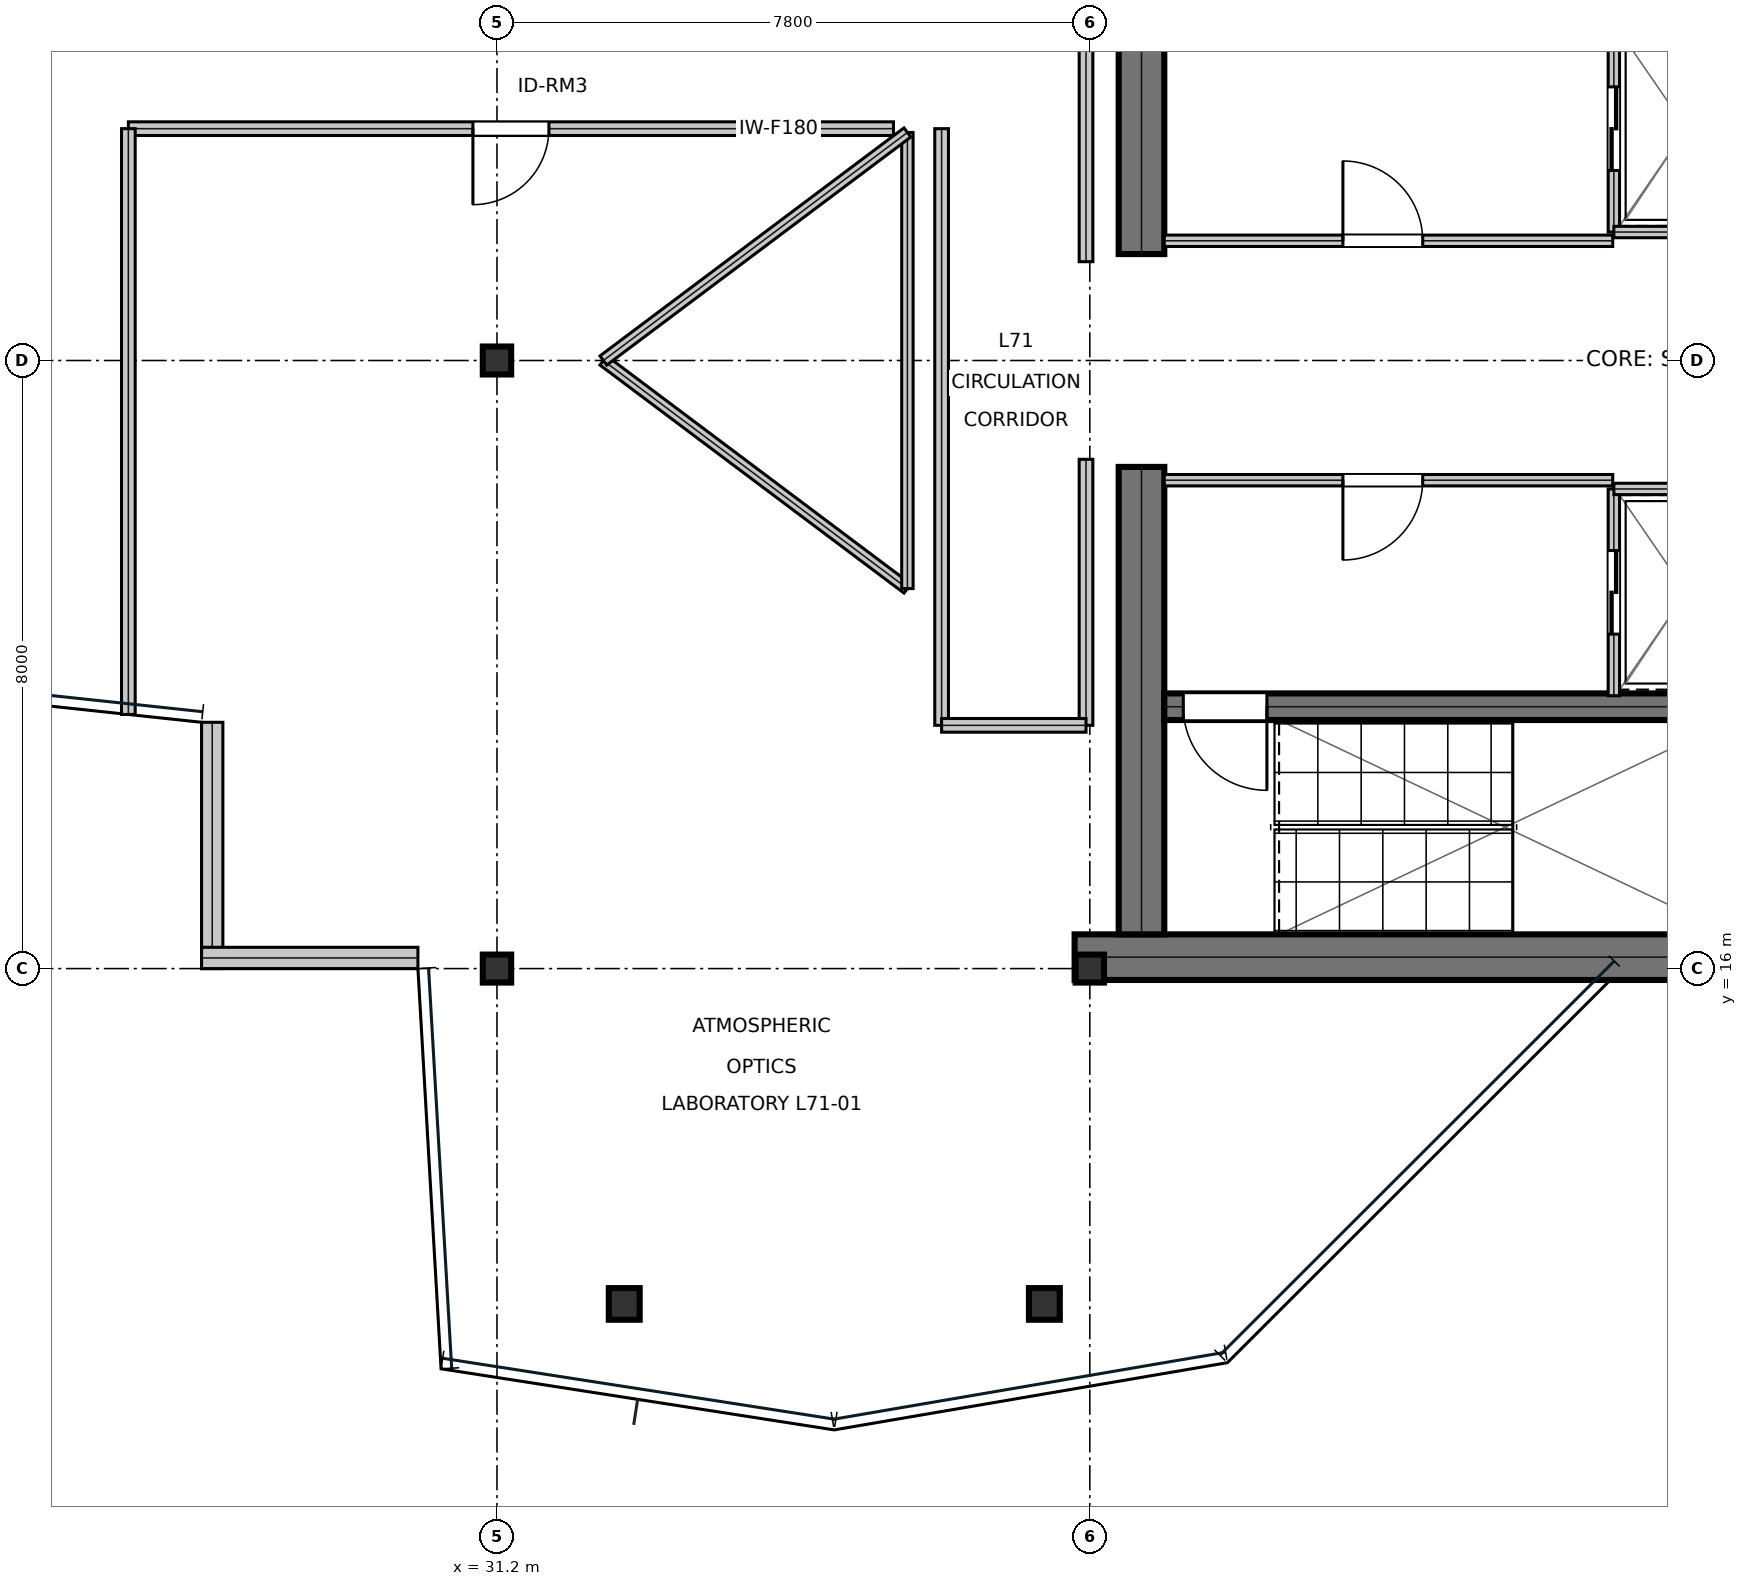
"""IFC4 building model, lengths in metres.
Left out: names, types, materials, properties, quantities, classifications, styles, units other than length and angle.
Written with IfcOpenShell. Run it as: python <this file> out.ifc"""

import sys

from ifc_helpers import new_model, si_unit, direction, frame, frame_2d, origin, origin_2d, place, context, subcontext, project, spatial, rectangle, i_section, extrude, element, fill, save


model = new_model("IFC4")
c1 = context("Model", 3, precision=1e-05, world=origin(), true_north=direction((0.0, 1.0)))
c2 = subcontext(c1, "Body", "Model", "MODEL_VIEW")
j1 = project(units=[si_unit("LENGTHUNIT", "METRE"), si_unit("PLANEANGLEUNIT", "RADIAN")], contexts=[c1])
p1 = place(None, origin())
s1 = spatial("IfcSite", under=j1, at=p1, CompositionType="ELEMENT")
p2 = place(p1, origin())
s2 = spatial("IfcBuilding", under=s1, at=p2, CompositionType="ELEMENT")
p3 = place(p2, frame((0.0, 0.0, 303.3)))
s3 = spatial("IfcBuildingStorey", under=s2, at=p3, CompositionType="ELEMENT", Elevation=303.3)
p4 = place(p3, frame((38.8, 16.15, 0.0), z_axis=(0.0, 0.0, 1.0), x_axis=(1.0, 0.0, 0.0)))
e1 = element("IfcWall", 1, at=p4, inside=s3, PredefinedType="SHEAR", context=c2, shape_type="SweptSolid", body=[
    extrude(rectangle(XDim=16.0, YDim=0.6, at=frame_2d((8.0, 0.0))), origin(), (0.0, 0.0, 1.0), 3.81),
])
for number, where, z_axis, x_axis in (
    (2, (39.68, 16.45, 0.0), (0.0, 0.0, 1.0), (0.0, 1.0, 0.0)),
    (3, (39.68, 25.4, 0.0), (0.0, 0.0, 1.0), (0.0, 1.0, 0.0)),
):
    element("IfcWall", number, at=place(p3, frame(where, z_axis=z_axis, x_axis=x_axis)), inside=s3, PredefinedType="SHEAR", context=c2, shape_type="SweptSolid", body=[
        extrude(rectangle(XDim=6.15, YDim=0.6, at=frame_2d((3.075, 0.0))), origin(), (0.0, 0.0, 1.0), 3.81),
    ])
p5 = place(p3, frame((39.98, 19.445, 0.0), z_axis=(0.0, 0.0, 1.0), x_axis=(1.0, 0.0, 0.0)))
e4 = element("IfcWall", 4, at=p5, inside=s3, PredefinedType="SHEAR", context=c2, shape_type="SweptSolid", body=[
    extrude(rectangle(XDim=7.71, YDim=0.35, at=frame_2d((3.855, 0.0))), origin(), (0.0, 0.0, 1.0), 3.81),
])
p6 = place(p5, frame((0.25, 0.0, 0.0)))
e5 = element("IfcOpeningElement", 5, at=p6, cuts=e4, PredefinedType="OPENING", context=c2, shape_type="SweptSolid", body=[
    extrude(rectangle(XDim=1.1, YDim=2.15, at=frame_2d((0.55, 1.075))), frame((0.0, 0.185, 0.0), z_axis=(0.0, -1.0, 0.0), x_axis=(1.0, 0.0, 0.0)), (0.0, 0.0, 1.0), 0.37),
])
for number, where, z_axis, x_axis in (
    (6, (31.2, 16.0, 0.0), (0.0, 0.0, 1.0), (1.0, 0.0, 0.0)),
    (7, (31.2, 24.0, 0.0), (0.0, 0.0, 1.0), (1.0, 0.0, 0.0)),
    (8, (39.0, 16.0, 0.0), (0.0, 0.0, 1.0), (1.0, 0.0, 0.0)),
):
    element("IfcColumn", number, at=place(p3, frame(where, z_axis=z_axis, x_axis=x_axis)), inside=s3, PredefinedType="COLUMN", context=c2, shape_type="SweptSolid", body=[
        extrude(i_section(OverallWidth=0.373, OverallDepth=0.368, WebThickness=0.015, FlangeThickness=0.024, at=origin_2d()), origin(), (0.0, 0.0, 1.0), 4.044),
    ])
for number, where, z_axis, x_axis in (
    (9, (32.875, 11.588, 0.016), (0.0, 0.0, 1.0), (1.0, 0.0, 0.0)),
    (10, (38.402, 11.588, 0.016), (0.0, 0.0, 1.0), (1.0, 0.0, 0.0)),
):
    element("IfcColumn", number, at=place(p3, frame(where, z_axis=z_axis, x_axis=x_axis)), inside=s3, PredefinedType="COLUMN", context=c2, shape_type="SweptSolid", body=[
        extrude(i_section(OverallWidth=0.406, OverallDepth=0.416, WebThickness=0.03, FlangeThickness=0.048, at=origin_2d()), origin(), (0.0, 0.0, 1.0), 4.018),
    ])
p7 = place(p3, frame((27.454, 19.24, 0.0), z_axis=(0.0, 0.0, 1.0), x_axis=(0.0, -1.0, 0.0)))
e11 = element("IfcWall", 11, at=p7, inside=s3, PredefinedType="STANDARD", context=c2, shape_type="SweptSolid", body=[
    extrude(rectangle(XDim=3.24, YDim=0.28, at=frame_2d((1.62, 0.0))), origin(), (0.0, 0.0, 1.0), 3.339),
])
p8 = place(p3, frame((27.314, 16.14, 0.0), z_axis=(0.0, 0.0, 1.0), x_axis=(1.0, 0.0, 0.0)))
e12 = element("IfcWall", 12, at=p8, inside=s3, PredefinedType="STANDARD", context=c2, shape_type="SweptSolid", body=[
    extrude(rectangle(XDim=2.846, YDim=0.28, at=frame_2d((1.423, 0.0))), origin(), (0.0, 0.0, 1.0), 3.81),
])
p9 = place(p3, frame((39.98, 25.575, 0.0), z_axis=(0.0, 0.0, 1.0), x_axis=(1.0, 0.0, 0.0)))
e13 = element("IfcWall", 13, at=p9, inside=s3, PredefinedType="PARTITIONING", context=c2, shape_type="SweptSolid", body=[
    extrude(rectangle(XDim=5.9, YDim=0.15, at=frame_2d((2.95, 0.0))), origin(), (0.0, 0.0, 1.0), 3.81),
])
p10 = place(p9, frame((2.35, 0.0, 0.0)))
e14 = element("IfcOpeningElement", 14, at=p10, cuts=e13, PredefinedType="OPENING", context=c2, shape_type="SweptSolid", body=[
    extrude(rectangle(XDim=1.05, YDim=2.15, at=frame_2d((0.525, 1.075))), frame((0.0, 0.085, 0.0), z_axis=(0.0, -1.0, 0.0), x_axis=(1.0, 0.0, 0.0)), (0.0, 0.0, 1.0), 0.17),
])
p11 = place(p3, frame((39.98, 22.425, 0.0), z_axis=(0.0, 0.0, 1.0), x_axis=(1.0, 0.0, 0.0)))
e15 = element("IfcWall", 15, at=p11, inside=s3, PredefinedType="PARTITIONING", context=c2, shape_type="SweptSolid", body=[
    extrude(rectangle(XDim=5.9, YDim=0.15, at=frame_2d((2.95, 0.0))), origin(), (0.0, 0.0, 1.0), 3.81),
])
p12 = place(p11, frame((2.35, 0.0, 0.0)))
e16 = element("IfcOpeningElement", 16, at=p12, cuts=e15, PredefinedType="OPENING", context=c2, shape_type="SweptSolid", body=[
    extrude(rectangle(XDim=1.05, YDim=2.15, at=frame_2d((0.525, 1.075))), frame((0.0, 0.085, 0.0), z_axis=(0.0, -1.0, 0.0), x_axis=(1.0, 0.0, 0.0)), (0.0, 0.0, 1.0), 0.17),
])
p13 = place(p3, frame((45.895, 25.69, 0.0), z_axis=(0.0, 0.0, 1.0), x_axis=(0.0, 1.0, 0.0)))
e17 = element("IfcWall", 17, at=p13, inside=s3, PredefinedType="PARTITIONING", context=c2, shape_type="SweptSolid", body=[
    extrude(rectangle(XDim=2.72, YDim=0.15, at=frame_2d((1.36, 0.0))), origin(), (0.0, 0.0, 1.0), 3.81),
])
p14 = place(p13, frame((0.81, 0.0, 0.0)))
e18 = element("IfcOpeningElement", 18, at=p14, cuts=e17, PredefinedType="OPENING", context=c2, shape_type="SweptSolid", body=[
    extrude(rectangle(XDim=1.1, YDim=2.15, at=frame_2d((0.55, 1.075))), frame((0.0, 0.085, 0.0), z_axis=(0.0, -1.0, 0.0), x_axis=(1.0, 0.0, 0.0)), (0.0, 0.0, 1.0), 0.17),
])
p15 = place(p3, frame((45.895, 25.69, 0.0), z_axis=(0.0, 0.0, 1.0), x_axis=(1.0, 0.0, 0.0)))
e19 = element("IfcWall", 19, at=p15, inside=s3, PredefinedType="PARTITIONING", context=c2, shape_type="SweptSolid", body=[
    extrude(rectangle(XDim=1.915, YDim=0.15, at=frame_2d((0.958, 0.0))), origin(), (0.0, 0.0, 1.0), 3.81),
])
p16 = place(p3, frame((45.895, 19.59, 0.0), z_axis=(0.0, 0.0, 1.0), x_axis=(0.0, 1.0, 0.0)))
e20 = element("IfcWall", 20, at=p16, inside=s3, PredefinedType="PARTITIONING", context=c2, shape_type="SweptSolid", body=[
    extrude(rectangle(XDim=2.72, YDim=0.15, at=frame_2d((1.36, 0.0))), origin(), (0.0, 0.0, 1.0), 3.81),
])
p17 = place(p16, frame((0.81, 0.0, 0.0)))
e21 = element("IfcOpeningElement", 21, at=p17, cuts=e20, PredefinedType="OPENING", context=c2, shape_type="SweptSolid", body=[
    extrude(rectangle(XDim=1.1, YDim=2.15, at=frame_2d((0.55, 1.075))), frame((0.0, 0.085, 0.0), z_axis=(0.0, -1.0, 0.0), x_axis=(1.0, 0.0, 0.0)), (0.0, 0.0, 1.0), 0.17),
])
p18 = place(p3, frame((45.895, 22.31, 0.0), z_axis=(0.0, 0.0, 1.0), x_axis=(1.0, 0.0, 0.0)))
e22 = element("IfcWall", 22, at=p18, inside=s3, PredefinedType="PARTITIONING", context=c2, shape_type="SweptSolid", body=[
    extrude(rectangle(XDim=1.915, YDim=0.15, at=frame_2d((0.958, 0.0))), origin(), (0.0, 0.0, 1.0), 3.81),
])
p19 = place(p3, frame((26.35, 27.05, 0.0), z_axis=(0.0, 0.0, 1.0), x_axis=(1.0, 0.0, 0.0)))
e23 = element("IfcWall", 23, at=p19, inside=s3, PredefinedType="SOLIDWALL", context=c2, shape_type="SweptSolid", body=[
    extrude(rectangle(XDim=10.067, YDim=0.18, at=frame_2d((5.033, 0.0))), origin(), (0.0, 0.0, 1.0), 3.27),
])
p20 = place(p19, frame((4.533, 0.0, 0.0)))
e24 = element("IfcOpeningElement", 24, at=p20, cuts=e23, PredefinedType="OPENING", context=c2, shape_type="SweptSolid", body=[
    extrude(rectangle(XDim=1.0, YDim=2.15, at=frame_2d((0.5, 1.075))), frame((0.0, 0.1, 0.0), z_axis=(0.0, -1.0, 0.0), x_axis=(1.0, 0.0, 0.0)), (0.0, 0.0, 1.0), 0.2),
])
p21 = place(p3, frame((37.05, 19.2, 0.0), z_axis=(0.0, 0.0, 1.0), x_axis=(0.0, 1.0, 0.0)))
e25 = element("IfcWall", 25, at=p21, inside=s3, PredefinedType="SOLIDWALL", context=c2, shape_type="SweptSolid", body=[
    extrude(rectangle(XDim=7.85, YDim=0.18, at=frame_2d((3.925, 0.0))), origin(), (0.0, 0.0, 1.0), 3.54),
])
p22 = place(p3, frame((26.35, 19.343, 0.0), z_axis=(0.0, 0.0, 1.0), x_axis=(0.0, 1.0, 0.0)))
e26 = element("IfcWall", 26, at=p22, inside=s3, PredefinedType="SOLIDWALL", context=c2, shape_type="SweptSolid", body=[
    extrude(rectangle(XDim=7.707, YDim=0.18, at=frame_2d((3.854, 0.0))), origin(), (0.0, 0.0, 1.0), 3.27),
])
p23 = place(p3, frame((38.95, 19.2, 0.0), z_axis=(0.0, 0.0, 1.0), x_axis=(0.0, 1.0, 0.0)))
e27 = element("IfcWall", 27, at=p23, inside=s3, PredefinedType="SOLIDWALL", context=c2, shape_type="SweptSolid", body=[
    extrude(rectangle(XDim=3.5, YDim=0.18, at=frame_2d((1.75, 0.0))), origin(), (0.0, 0.0, 1.0), 3.54),
])
p24 = place(p3, frame((37.05, 19.2, 0.0), z_axis=(0.0, 0.0, 1.0), x_axis=(1.0, 0.0, 0.0)))
e28 = element("IfcWall", 28, at=p24, inside=s3, PredefinedType="SOLIDWALL", context=c2, shape_type="SweptSolid", body=[
    extrude(rectangle(XDim=1.9, YDim=0.18, at=frame_2d((0.95, 0.0))), origin(), (0.0, 0.0, 1.0), 3.81),
])
p25 = place(p3, frame((38.95, 25.3, 0.0), z_axis=(0.0, 0.0, 1.0), x_axis=(0.0, 1.0, 0.0)))
e29 = element("IfcWall", 29, at=p25, inside=s3, PredefinedType="SOLIDWALL", context=c2, shape_type="SweptSolid", body=[
    extrude(rectangle(XDim=3.5, YDim=0.18, at=frame_2d((1.75, 0.0))), origin(), (0.0, 0.0, 1.0), 3.54),
])
p26 = place(p3, frame((32.6, 24.0, 0.0), z_axis=(0.0, 0.0, 1.0), x_axis=(0.8, -0.6, 0.0)))
e30 = element("IfcWall", 30, at=p26, inside=s3, PredefinedType="MOVABLE", context=c2, shape_type="SweptSolid", body=[
    extrude(rectangle(XDim=5.0, YDim=0.15, at=frame_2d((2.5, 0.0))), origin(), (0.0, 0.0, 1.0), 3.81),
])
p27 = place(p3, frame((36.6, 21.0, 0.0), z_axis=(0.0, 0.0, 1.0), x_axis=(0.0, 1.0, 0.0)))
e31 = element("IfcWall", 31, at=p27, inside=s3, PredefinedType="MOVABLE", context=c2, shape_type="SweptSolid", body=[
    extrude(rectangle(XDim=6.0, YDim=0.15, at=frame_2d((3.0, 0.0))), origin(), (0.0, 0.0, 1.0), 3.81),
])
p28 = place(p3, frame((36.6, 27.0, 0.0), z_axis=(0.0, 0.0, 1.0), x_axis=(-0.8, -0.6, 0.0)))
e32 = element("IfcWall", 32, at=p28, inside=s3, PredefinedType="MOVABLE", context=c2, shape_type="SweptSolid", body=[
    extrude(rectangle(XDim=5.0, YDim=0.15, at=frame_2d((2.5, 0.0))), origin(), (0.0, 0.0, 1.0), 3.81),
])
p29 = place(p10, origin())
e33 = element("IfcDoor", 33, at=p29, inside=s3, OperationType="SINGLE_SWING_LEFT", PredefinedType="DOOR", context=c2, shape_type="SweptSolid", body=[
    extrude(rectangle(XDim=1.05, YDim=2.15, at=frame_2d((0.525, 1.075))), frame((0.0, 0.025, 0.0), z_axis=(0.0, -1.0, 0.0), x_axis=(1.0, 0.0, 0.0)), (0.0, 0.0, 1.0), 0.05),
])
fill(e14, e33)
p30 = place(p12, frame((1.05, 0.0, 0.0), z_axis=(0.0, 0.0, 1.0), x_axis=(-1.0, 0.0, 0.0)))
e34 = element("IfcDoor", 34, at=p30, inside=s3, OperationType="SINGLE_SWING_RIGHT", PredefinedType="DOOR", context=c2, shape_type="SweptSolid", body=[
    extrude(rectangle(XDim=1.05, YDim=2.15, at=frame_2d((0.525, 1.075))), frame((0.0, 0.025, 0.0), z_axis=(0.0, -1.0, 0.0), x_axis=(1.0, 0.0, 0.0)), (0.0, 0.0, 1.0), 0.05),
])
fill(e16, e34)
p31 = place(p14, frame((1.1, 0.0, 0.0), z_axis=(0.0, 0.0, 1.0), x_axis=(-1.0, 0.0, 0.0)))
e35 = element("IfcDoor", 35, at=p31, inside=s3, OperationType="DOUBLE_DOOR_SLIDING", PredefinedType="DOOR", context=c2, shape_type="SweptSolid", body=[
    extrude(rectangle(XDim=1.1, YDim=2.15, at=frame_2d((0.55, 1.075))), frame((0.0, 0.025, 0.0), z_axis=(0.0, -1.0, 0.0), x_axis=(1.0, 0.0, 0.0)), (0.0, 0.0, 1.0), 0.05),
])
fill(e18, e35)
p32 = place(p17, frame((1.1, 0.0, 0.0), z_axis=(0.0, 0.0, 1.0), x_axis=(-1.0, 0.0, 0.0)))
e36 = element("IfcDoor", 36, at=p32, inside=s3, OperationType="DOUBLE_DOOR_SLIDING", PredefinedType="DOOR", context=c2, shape_type="SweptSolid", body=[
    extrude(rectangle(XDim=1.1, YDim=2.15, at=frame_2d((0.55, 1.075))), frame((0.0, 0.025, 0.0), z_axis=(0.0, -1.0, 0.0), x_axis=(1.0, 0.0, 0.0)), (0.0, 0.0, 1.0), 0.05),
])
fill(e21, e36)
p33 = place(p20, frame((1.0, 0.0, 0.0), z_axis=(0.0, 0.0, 1.0), x_axis=(-1.0, 0.0, 0.0)))
e37 = element("IfcDoor", 37, at=p33, inside=s3, OperationType="SINGLE_SWING_RIGHT", PredefinedType="DOOR", context=c2, shape_type="SweptSolid", body=[
    extrude(rectangle(XDim=1.0, YDim=2.15, at=frame_2d((0.5, 1.075))), frame((0.0, 0.025, 0.0), z_axis=(0.0, -1.0, 0.0), x_axis=(1.0, 0.0, 0.0)), (0.0, 0.0, 1.0), 0.05),
])
fill(e24, e37)
p34 = place(p6, frame((1.1, 0.0, 0.0), z_axis=(0.0, 0.0, 1.0), x_axis=(-1.0, 0.0, 0.0)))
e38 = element("IfcDoor", 38, at=p34, inside=s3, OperationType="SINGLE_SWING_LEFT", PredefinedType="DOOR", context=c2, shape_type="SweptSolid", body=[
    extrude(rectangle(XDim=1.1, YDim=2.15, at=frame_2d((0.55, 1.075))), frame((0.0, 0.025, 0.0), z_axis=(0.0, -1.0, 0.0), x_axis=(1.0, 0.0, 0.0)), (0.0, 0.0, 1.0), 0.05),
])
fill(e5, e38)
save(model, sys.argv[1])
